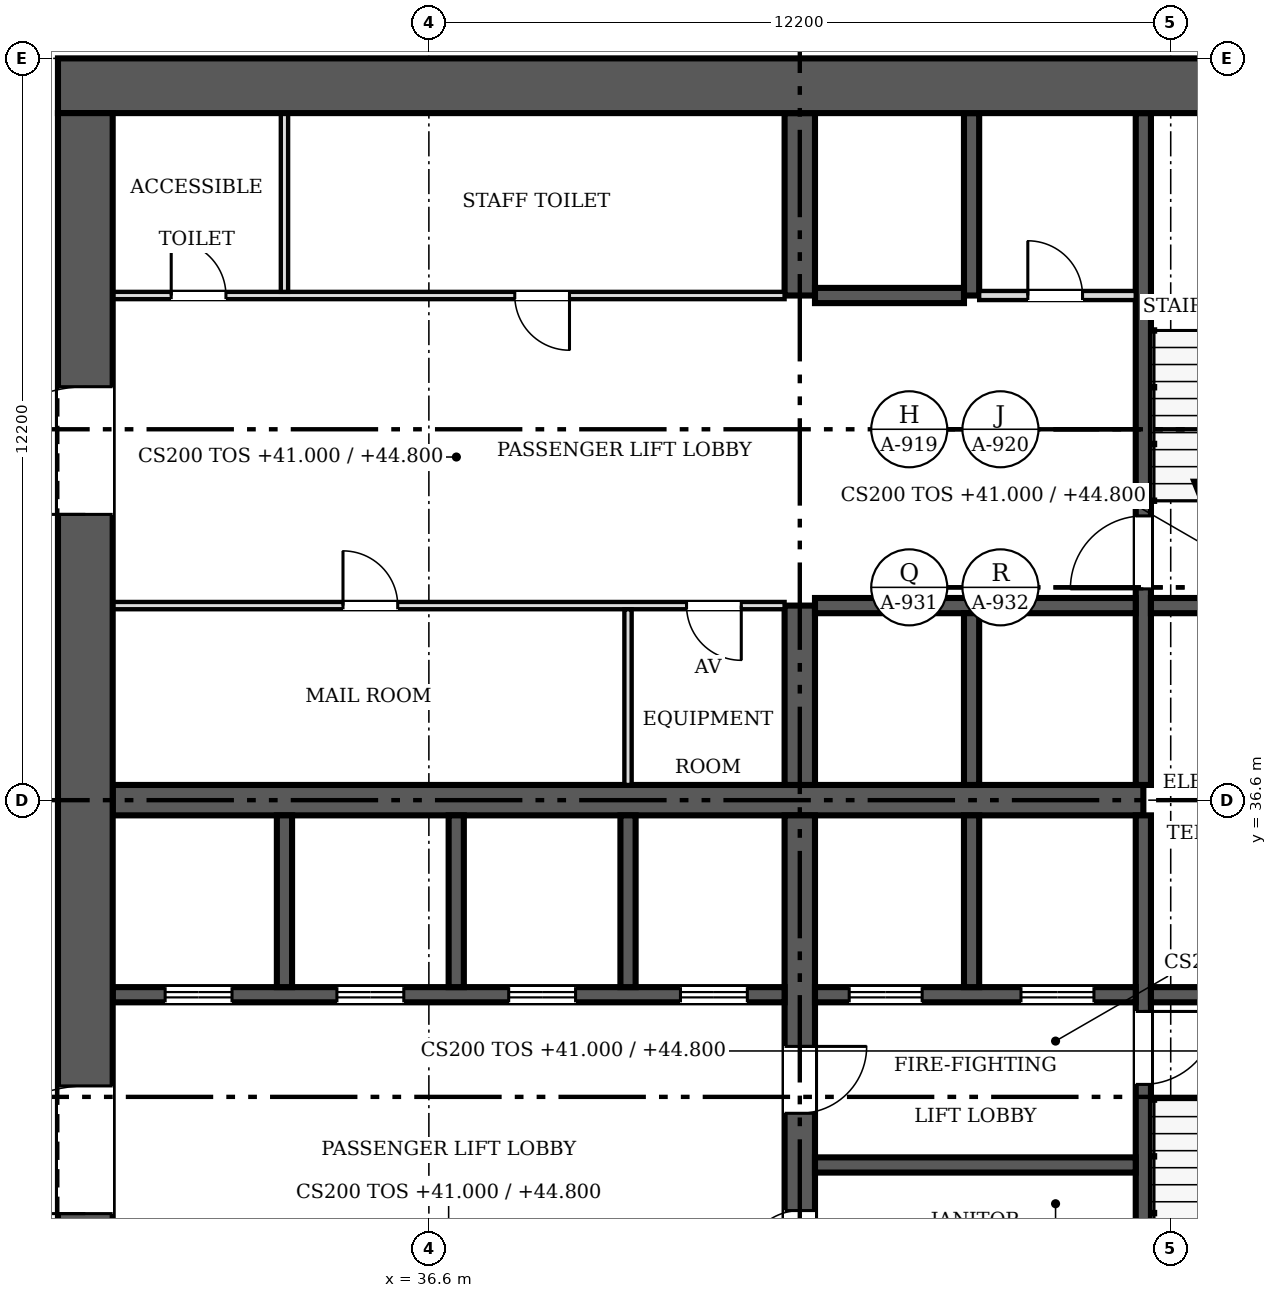
"""IFC4 building model, lengths in metres.
Left out: names, types, materials, properties, quantities, classifications, styles, units other than length and angle.
Written with IfcOpenShell. Run it as: python <this file> out.ifc"""

import sys

from ifc_helpers import new_model, si_unit, direction, frame, frame_2d, origin, place, context, subcontext, project, spatial, rectangle, extrude, source, transform, mapped, element, fill, save


model = new_model("IFC4")
c1 = context("Model", 3, precision=1e-05, world=origin(), true_north=direction((0.0, 1.0)))
c2 = subcontext(c1, "Body", "Model", "MODEL_VIEW")
j1 = project(units=[si_unit("LENGTHUNIT", "METRE"), si_unit("PLANEANGLEUNIT", "RADIAN")], contexts=[c1])
p1 = place(None, origin())
s1 = spatial("IfcSite", under=j1, at=p1, CompositionType="ELEMENT")
p2 = place(p1, origin())
s2 = spatial("IfcBuilding", under=s1, at=p2, CompositionType="ELEMENT")
p3 = place(p2, frame((0.0, 0.0, 41.0)))
s3 = spatial("IfcBuildingStorey", under=s2, at=p3, CompositionType="ELEMENT", Elevation=41.0)
p4 = place(p3, frame((30.95, 25.3, 0.0), z_axis=(0.0, 0.0, 1.0), x_axis=(0.0, 1.0, 0.0)))
e1 = element("IfcWall", 1, at=p4, inside=s3, PredefinedType="SHEAR", context=c2, shape_type="SweptSolid", body=[
    extrude(rectangle(XDim=22.6, YDim=0.9, at=frame_2d((11.3, 0.0))), origin(), (0.0, 0.0, 1.0), 3.8),
])
m1 = source(origin(), c2, "Body", "SweptSolid", [
    extrude(rectangle(XDim=2.1, YDim=2.4, at=frame_2d((1.05, 1.2))), frame((0.0, 0.46, 0.0), z_axis=(0.0, -1.0, 0.0), x_axis=(1.0, 0.0, 0.0)), (0.0, 0.0, 1.0), 0.92),
])
p5 = place(p4, frame((4.5, 0.0, 0.0)))
e2 = element("IfcOpeningElement", 2, at=p5, cuts=e1, PredefinedType="OPENING", context=c2, shape_type="MappedRepresentation", body=[
    mapped(m1, transform((0.0, 0.0, 0.0), scale=1.0)),
])
p6 = place(p4, frame((16.0, 0.0, 0.0)))
e3 = element("IfcOpeningElement", 3, at=p6, cuts=e1, PredefinedType="OPENING", context=c2, shape_type="MappedRepresentation", body=[
    mapped(m1, transform((0.0, 0.0, 0.0), scale=1.0)),
])
p7 = place(p3, frame((30.5, 48.35, 0.0), z_axis=(0.0, 0.0, 1.0), x_axis=(1.0, 0.0, 0.0)))
e4 = element("IfcWall", 4, at=p7, inside=s3, PredefinedType="SHEAR", context=c2, shape_type="SweptSolid", body=[
    extrude(rectangle(XDim=24.4, YDim=0.9, at=frame_2d((12.2, 0.0))), origin(), (0.0, 0.0, 1.0), 3.8),
])
p8 = place(p3, frame((31.4, 36.6, 0.0), z_axis=(0.0, 0.0, 1.0), x_axis=(1.0, 0.0, 0.0)))
e5 = element("IfcWall", 5, at=p8, inside=s3, PredefinedType="SHEAR", context=c2, shape_type="SweptSolid", body=[
    extrude(rectangle(XDim=16.95, YDim=0.5, at=frame_2d((8.475, 0.0))), origin(), (0.0, 0.0, 1.0), 3.8),
])
p9 = place(p3, frame((42.7, 36.35, 0.0), z_axis=(0.0, 0.0, 1.0), x_axis=(0.0, -1.0, 0.0)))
e6 = element("IfcWall", 6, at=p9, inside=s3, PredefinedType="SHEAR", context=c2, shape_type="SweptSolid", body=[
    extrude(rectangle(XDim=11.05, YDim=0.5, at=frame_2d((5.525, 0.0))), origin(), (0.0, 0.0, 1.0), 3.8),
])
m2 = source(origin(), c2, "Body", "SweptSolid", [
    extrude(rectangle(XDim=0.9, YDim=2.1, at=frame_2d((0.45, 1.05))), frame((0.0, 0.26, 0.0), z_axis=(0.0, -1.0, 0.0), x_axis=(1.0, 0.0, 0.0)), (0.0, 0.0, 1.0), 0.52),
])
p10 = place(p9, frame((6.5, 0.0, 0.0)))
e7 = element("IfcOpeningElement", 7, at=p10, cuts=e6, PredefinedType="OPENING", context=c2, shape_type="MappedRepresentation", body=[
    mapped(m2, transform((0.0, 0.0, 0.0), scale=1.0)),
])
m3 = source(origin(), c2, "Body", "SweptSolid", [
    extrude(rectangle(XDim=1.1, YDim=2.1, at=frame_2d((0.55, 1.05))), frame((0.0, 0.26, 0.0), z_axis=(0.0, -1.0, 0.0), x_axis=(1.0, 0.0, 0.0)), (0.0, 0.0, 1.0), 0.52),
])
p11 = place(p9, frame((3.8, 0.0, 0.0)))
e8 = element("IfcOpeningElement", 8, at=p11, cuts=e6, PredefinedType="OPENING", context=c2, shape_type="MappedRepresentation", body=[
    mapped(m3, transform((0.0, 0.0, 0.0), scale=1.0)),
])
p12 = place(p3, frame((42.7, 36.85, 0.0), z_axis=(0.0, 0.0, 1.0), x_axis=(0.0, 1.0, 0.0)))
e9 = element("IfcWall", 9, at=p12, inside=s3, PredefinedType="SHEAR", context=c2, shape_type="SweptSolid", body=[
    extrude(rectangle(XDim=2.95, YDim=0.5, at=frame_2d((1.475, 0.0))), origin(), (0.0, 0.0, 1.0), 3.8),
])
p13 = place(p3, frame((42.7, 44.9, 0.0), z_axis=(0.0, 0.0, 1.0), x_axis=(0.0, 1.0, 0.0)))
e10 = element("IfcWall", 10, at=p13, inside=s3, PredefinedType="SHEAR", context=c2, shape_type="SweptSolid", body=[
    extrude(rectangle(XDim=3.0, YDim=0.5, at=frame_2d((1.5, 0.0))), origin(), (0.0, 0.0, 1.0), 3.8),
])
p14 = place(p3, frame((48.35, 36.35, 0.0), z_axis=(0.0, 0.0, 1.0), x_axis=(0.0, -1.0, 0.0)))
e11 = element("IfcWall", 11, at=p14, inside=s3, PredefinedType="SOLIDWALL", context=c2, shape_type="SweptSolid", body=[
    extrude(rectangle(XDim=11.05, YDim=0.25, at=frame_2d((5.525, 0.0))), origin(), (0.0, 0.0, 1.0), 3.8),
])
m4 = source(origin(), c2, "Body", "SweptSolid", [
    extrude(rectangle(XDim=1.2, YDim=2.1, at=frame_2d((0.6, 1.05))), frame((0.0, 0.135, 0.0), z_axis=(0.0, -1.0, 0.0), x_axis=(1.0, 0.0, 0.0)), (0.0, 0.0, 1.0), 0.27),
])
p15 = place(p14, frame((3.225, 0.0, 0.0)))
e12 = element("IfcOpeningElement", 12, at=p15, cuts=e11, PredefinedType="OPENING", context=c2, shape_type="MappedRepresentation", body=[
    mapped(m4, transform((0.0, 0.0, 0.0), scale=1.0)),
])
p16 = place(p3, frame((48.35, 47.9, 0.0), z_axis=(0.0, 0.0, 1.0), x_axis=(0.0, -1.0, 0.0)))
e13 = element("IfcWall", 13, at=p16, inside=s3, PredefinedType="SOLIDWALL", context=c2, shape_type="SweptSolid", body=[
    extrude(rectangle(XDim=11.05, YDim=0.25, at=frame_2d((5.525, 0.0))), origin(), (0.0, 0.0, 1.0), 3.8),
])
p17 = place(p16, frame((6.625, 0.0, 0.0)))
e14 = element("IfcOpeningElement", 14, at=p17, cuts=e13, PredefinedType="OPENING", context=c2, shape_type="MappedRepresentation", body=[
    mapped(m4, transform((0.0, 0.0, 0.0), scale=1.0)),
])
p18 = place(p3, frame((42.45, 33.4, 0.0), z_axis=(0.0, 0.0, 1.0), x_axis=(-1.0, 0.0, 0.0)))
e15 = element("IfcWall", 15, at=p18, inside=s3, PredefinedType="SOLIDWALL", context=c2, shape_type="SweptSolid", body=[
    extrude(rectangle(XDim=11.05, YDim=0.25, at=frame_2d((5.525, 0.0))), origin(), (0.0, 0.0, 1.0), 3.8),
])
m5 = source(origin(), c2, "Body", "SweptSolid", [
    extrude(rectangle(XDim=1.1, YDim=2.1, at=frame_2d((0.55, 1.05))), frame((0.0, 0.135, 0.0), z_axis=(0.0, -1.0, 0.0), x_axis=(1.0, 0.0, 0.0)), (0.0, 0.0, 1.0), 0.27),
])
p19 = place(p18, frame((9.087, 0.0, 0.0)))
e16 = element("IfcOpeningElement", 16, at=p19, cuts=e15, PredefinedType="OPENING", context=c2, shape_type="MappedRepresentation", body=[
    mapped(m5, transform((0.0, 0.0, 0.0), scale=1.0)),
])
p20 = place(p18, frame((6.262, 0.0, 0.0)))
e17 = element("IfcOpeningElement", 17, at=p20, cuts=e15, PredefinedType="OPENING", context=c2, shape_type="MappedRepresentation", body=[
    mapped(m5, transform((0.0, 0.0, 0.0), scale=1.0)),
])
p21 = place(p18, frame((3.438, 0.0, 0.0)))
e18 = element("IfcOpeningElement", 18, at=p21, cuts=e15, PredefinedType="OPENING", context=c2, shape_type="MappedRepresentation", body=[
    mapped(m5, transform((0.0, 0.0, 0.0), scale=1.0)),
])
p22 = place(p18, frame((0.613, 0.0, 0.0)))
e19 = element("IfcOpeningElement", 19, at=p22, cuts=e15, PredefinedType="OPENING", context=c2, shape_type="MappedRepresentation", body=[
    mapped(m5, transform((0.0, 0.0, 0.0), scale=1.0)),
])
p23 = place(p3, frame((48.225, 33.4, 0.0), z_axis=(0.0, 0.0, 1.0), x_axis=(-1.0, 0.0, 0.0)))
e20 = element("IfcWall", 20, at=p23, inside=s3, PredefinedType="SOLIDWALL", context=c2, shape_type="SweptSolid", body=[
    extrude(rectangle(XDim=5.275, YDim=0.25, at=frame_2d((2.638, 0.0))), origin(), (0.0, 0.0, 1.0), 3.8),
])
p24 = place(p23, frame((3.512, 0.0, 0.0)))
e21 = element("IfcOpeningElement", 21, at=p24, cuts=e20, PredefinedType="OPENING", context=c2, shape_type="MappedRepresentation", body=[
    mapped(m4, transform((0.0, 0.0, 0.0), scale=1.0)),
])
p25 = place(p23, frame((0.688, 0.0, 0.0)))
e22 = element("IfcOpeningElement", 22, at=p25, cuts=e20, PredefinedType="OPENING", context=c2, shape_type="MappedRepresentation", body=[
    mapped(m4, transform((0.0, 0.0, 0.0), scale=1.0)),
])
p26 = place(p3, frame((48.475, 33.4, 0.0), z_axis=(0.0, 0.0, 1.0), x_axis=(1.0, 0.0, 0.0)))
e23 = element("IfcWall", 23, at=p26, inside=s3, PredefinedType="SOLIDWALL", context=c2, shape_type="SweptSolid", body=[
    extrude(rectangle(XDim=3.525, YDim=0.25, at=frame_2d((1.762, 0.0))), origin(), (0.0, 0.0, 1.0), 3.8),
])
p27 = place(p3, frame((42.95, 39.8, 0.0), z_axis=(0.0, 0.0, 1.0), x_axis=(1.0, 0.0, 0.0)))
e24 = element("IfcWall", 24, at=p27, inside=s3, PredefinedType="SOLIDWALL", context=c2, shape_type="SweptSolid", body=[
    extrude(rectangle(XDim=5.275, YDim=0.25, at=frame_2d((2.638, 0.0))), origin(), (0.0, 0.0, 1.0), 3.8),
])
p28 = place(p3, frame((48.475, 39.8, 0.0), z_axis=(0.0, 0.0, 1.0), x_axis=(1.0, 0.0, 0.0)))
e25 = element("IfcWall", 25, at=p28, inside=s3, PredefinedType="SOLIDWALL", context=c2, shape_type="SweptSolid", body=[
    extrude(rectangle(XDim=3.525, YDim=0.25, at=frame_2d((1.762, 0.0))), origin(), (0.0, 0.0, 1.0), 3.8),
])
p29 = place(p3, frame((45.525, 33.525, 0.0), z_axis=(0.0, 0.0, 1.0), x_axis=(0.0, 1.0, 0.0)))
e26 = element("IfcWall", 26, at=p29, inside=s3, PredefinedType="SOLIDWALL", context=c2, shape_type="SweptSolid", body=[
    extrude(rectangle(XDim=2.825, YDim=0.25, at=frame_2d((1.413, 0.0))), origin(), (0.0, 0.0, 1.0), 3.8),
])
p30 = place(p3, frame((45.525, 36.85, 0.0), z_axis=(0.0, 0.0, 1.0), x_axis=(0.0, 1.0, 0.0)))
e27 = element("IfcWall", 27, at=p30, inside=s3, PredefinedType="SOLIDWALL", context=c2, shape_type="SweptSolid", body=[
    extrude(rectangle(XDim=2.825, YDim=0.25, at=frame_2d((1.413, 0.0))), origin(), (0.0, 0.0, 1.0), 3.8),
])
p31 = place(p3, frame((42.95, 30.6, 0.0), z_axis=(0.0, 0.0, 1.0), x_axis=(1.0, 0.0, 0.0)))
e28 = element("IfcWall", 28, at=p31, inside=s3, PredefinedType="SOLIDWALL", context=c2, shape_type="SweptSolid", body=[
    extrude(rectangle(XDim=5.275, YDim=0.25, at=frame_2d((2.638, 0.0))), origin(), (0.0, 0.0, 1.0), 3.8),
])
for number, where, z_axis, x_axis in (
    (29, (34.225, 33.525, 0.0), (0.0, 0.0, 1.0), (0.0, 1.0, 0.0)),
    (30, (37.05, 33.525, 0.0), (0.0, 0.0, 1.0), (0.0, 1.0, 0.0)),
    (31, (39.875, 33.525, 0.0), (0.0, 0.0, 1.0), (0.0, 1.0, 0.0)),
):
    element("IfcWall", number, at=place(p3, frame(where, z_axis=z_axis, x_axis=x_axis)), inside=s3, PredefinedType="SOLIDWALL", context=c2, shape_type="SweptSolid", body=[
        extrude(rectangle(XDim=2.825, YDim=0.25, at=frame_2d((1.413, 0.0))), origin(), (0.0, 0.0, 1.0), 3.8),
    ])
p32 = place(p3, frame((45.525, 44.9, 0.0), z_axis=(0.0, 0.0, 1.0), x_axis=(0.0, 1.0, 0.0)))
e32 = element("IfcWall", 32, at=p32, inside=s3, PredefinedType="SOLIDWALL", context=c2, shape_type="SweptSolid", body=[
    extrude(rectangle(XDim=3.0, YDim=0.25, at=frame_2d((1.5, 0.0))), origin(), (0.0, 0.0, 1.0), 3.8),
])
p33 = place(p3, frame((42.95, 44.9, 0.0), z_axis=(0.0, 0.0, 1.0), x_axis=(1.0, 0.0, 0.0)))
e33 = element("IfcWall", 33, at=p33, inside=s3, PredefinedType="SOLIDWALL", context=c2, shape_type="SweptSolid", body=[
    extrude(rectangle(XDim=2.45, YDim=0.25, at=frame_2d((1.225, 0.0))), origin(), (0.0, 0.0, 1.0), 3.8),
])
p34 = place(p3, frame((42.45, 39.8, 0.0), z_axis=(0.0, 0.0, 1.0), x_axis=(-1.0, 0.0, 0.0)))
e34 = element("IfcWall", 34, at=p34, inside=s3, PredefinedType="PARTITIONING", context=c2, shape_type="SweptSolid", body=[
    extrude(rectangle(XDim=11.05, YDim=0.12, at=frame_2d((5.525, 0.0))), origin(), (0.0, 0.0, 1.0), 3.6),
])
m6 = source(origin(), c2, "Body", "SweptSolid", [
    extrude(rectangle(XDim=0.9, YDim=2.1, at=frame_2d((0.45, 1.05))), frame((0.0, 0.07, 0.0), z_axis=(0.0, -1.0, 0.0), x_axis=(1.0, 0.0, 0.0)), (0.0, 0.0, 1.0), 0.14),
])
p35 = place(p34, frame((6.363, 0.0, 0.0)))
e35 = element("IfcOpeningElement", 35, at=p35, cuts=e34, PredefinedType="OPENING", context=c2, shape_type="MappedRepresentation", body=[
    mapped(m6, transform((0.0, 0.0, 0.0), scale=1.0)),
])
p36 = place(p34, frame((0.712, 0.0, 0.0)))
e36 = element("IfcOpeningElement", 36, at=p36, cuts=e34, PredefinedType="OPENING", context=c2, shape_type="MappedRepresentation", body=[
    mapped(m6, transform((0.0, 0.0, 0.0), scale=1.0)),
])
p37 = place(p3, frame((31.4, 44.9, 0.0), z_axis=(0.0, 0.0, 1.0), x_axis=(1.0, 0.0, 0.0)))
e37 = element("IfcWall", 37, at=p37, inside=s3, PredefinedType="PARTITIONING", context=c2, shape_type="SweptSolid", body=[
    extrude(rectangle(XDim=11.05, YDim=0.12, at=frame_2d((5.525, 0.0))), origin(), (0.0, 0.0, 1.0), 3.6),
])
p38 = place(p37, frame((0.962, 0.0, 0.0)))
e38 = element("IfcOpeningElement", 38, at=p38, cuts=e37, PredefinedType="OPENING", context=c2, shape_type="MappedRepresentation", body=[
    mapped(m6, transform((0.0, 0.0, 0.0), scale=1.0)),
])
p39 = place(p37, frame((6.613, 0.0, 0.0)))
e39 = element("IfcOpeningElement", 39, at=p39, cuts=e37, PredefinedType="OPENING", context=c2, shape_type="MappedRepresentation", body=[
    mapped(m6, transform((0.0, 0.0, 0.0), scale=1.0)),
])
p40 = place(p3, frame((39.875, 36.85, 0.0), z_axis=(0.0, 0.0, 1.0), x_axis=(0.0, 1.0, 0.0)))
e40 = element("IfcWall", 40, at=p40, inside=s3, PredefinedType="PARTITIONING", context=c2, shape_type="SweptSolid", body=[
    extrude(rectangle(XDim=2.89, YDim=0.12, at=frame_2d((1.445, 0.0))), origin(), (0.0, 0.0, 1.0), 3.6),
])
p41 = place(p3, frame((34.225, 44.96, 0.0), z_axis=(0.0, 0.0, 1.0), x_axis=(0.0, 1.0, 0.0)))
e41 = element("IfcWall", 41, at=p41, inside=s3, PredefinedType="PARTITIONING", context=c2, shape_type="SweptSolid", body=[
    extrude(rectangle(XDim=2.94, YDim=0.12, at=frame_2d((1.47, 0.0))), origin(), (0.0, 0.0, 1.0), 3.6),
])
p42 = place(p3, frame((45.65, 44.9, 0.0), z_axis=(0.0, 0.0, 1.0), x_axis=(1.0, 0.0, 0.0)))
e42 = element("IfcWall", 42, at=p42, inside=s3, PredefinedType="PARTITIONING", context=c2, shape_type="SweptSolid", body=[
    extrude(rectangle(XDim=2.575, YDim=0.15, at=frame_2d((1.288, 0.0))), origin(), (0.0, 0.0, 1.0), 3.6),
])
m7 = source(origin(), c2, "Body", "SweptSolid", [
    extrude(rectangle(XDim=0.9, YDim=2.1, at=frame_2d((0.45, 1.05))), frame((0.0, 0.085, 0.0), z_axis=(0.0, -1.0, 0.0), x_axis=(1.0, 0.0, 0.0)), (0.0, 0.0, 1.0), 0.17),
])
p43 = place(p42, frame((0.8, 0.0, 0.0)))
e43 = element("IfcOpeningElement", 43, at=p43, cuts=e42, PredefinedType="OPENING", context=c2, shape_type="MappedRepresentation", body=[
    mapped(m7, transform((0.0, 0.0, 0.0), scale=1.0)),
])
m8 = source(origin(), c2, "Body", "SweptSolid", [
    extrude(rectangle(XDim=2.1, YDim=2.4, at=frame_2d((1.05, 1.2))), frame((0.0, 0.025, 0.0), z_axis=(0.0, -1.0, 0.0), x_axis=(1.0, 0.0, 0.0)), (0.0, 0.0, 1.0), 0.05),
])
p44 = place(p5, origin())
e44 = element("IfcDoor", 44, at=p44, inside=s3, OperationType="DOUBLE_DOOR_SINGLE_SWING", PredefinedType="DOOR", context=c2, shape_type="MappedRepresentation", body=[
    mapped(m8, transform((0.0, 0.0, 0.0), scale=1.0)),
])
fill(e2, e44)
p45 = place(p6, origin())
e45 = element("IfcDoor", 45, at=p45, inside=s3, OperationType="DOUBLE_DOOR_SINGLE_SWING", PredefinedType="DOOR", context=c2, shape_type="MappedRepresentation", body=[
    mapped(m8, transform((0.0, 0.0, 0.0), scale=1.0)),
])
fill(e3, e45)
m9 = source(origin(), c2, "Body", "SweptSolid", [
    extrude(rectangle(XDim=0.9, YDim=2.1, at=frame_2d((0.45, 1.05))), frame((0.0, 0.025, 0.0), z_axis=(0.0, -1.0, 0.0), x_axis=(1.0, 0.0, 0.0)), (0.0, 0.0, 1.0), 0.05),
])
p46 = place(p10, origin())
e46 = element("IfcDoor", 46, at=p46, inside=s3, OperationType="SINGLE_SWING_RIGHT", PredefinedType="DOOR", context=c2, shape_type="MappedRepresentation", body=[
    mapped(m9, transform((0.0, 0.0, 0.0), scale=1.0)),
])
fill(e7, e46)
m10 = source(origin(), c2, "Body", "SweptSolid", [
    extrude(rectangle(XDim=1.1, YDim=2.1, at=frame_2d((0.55, 1.05))), frame((0.0, 0.025, 0.0), z_axis=(0.0, -1.0, 0.0), x_axis=(1.0, 0.0, 0.0)), (0.0, 0.0, 1.0), 0.05),
])
p47 = place(p11, origin())
e47 = element("IfcDoor", 47, at=p47, inside=s3, OperationType="SINGLE_SWING_LEFT", PredefinedType="DOOR", context=c2, shape_type="MappedRepresentation", body=[
    mapped(m10, transform((0.0, 0.0, 0.0), scale=1.0)),
])
fill(e8, e47)
m11 = source(origin(), c2, "Body", "SweptSolid", [
    extrude(rectangle(XDim=1.2, YDim=2.1, at=frame_2d((0.6, 1.05))), frame((0.0, 0.025, 0.0), z_axis=(0.0, -1.0, 0.0), x_axis=(1.0, 0.0, 0.0)), (0.0, 0.0, 1.0), 0.05),
])
p48 = place(p15, origin())
e48 = element("IfcDoor", 48, at=p48, inside=s3, OperationType="SINGLE_SWING_LEFT", PredefinedType="DOOR", context=c2, shape_type="MappedRepresentation", body=[
    mapped(m11, transform((0.0, 0.0, 0.0), scale=1.0)),
])
fill(e12, e48)
p49 = place(p17, origin())
e49 = element("IfcDoor", 49, at=p49, inside=s3, OperationType="SINGLE_SWING_RIGHT", PredefinedType="DOOR", context=c2, shape_type="MappedRepresentation", body=[
    mapped(m11, transform((0.0, 0.0, 0.0), scale=1.0)),
])
fill(e14, e49)
p50 = place(p19, origin())
e50 = element("IfcDoor", 50, at=p50, inside=s3, OperationType="DOUBLE_DOOR_SLIDING", PredefinedType="DOOR", context=c2, shape_type="MappedRepresentation", body=[
    mapped(m10, transform((0.0, 0.0, 0.0), scale=1.0)),
])
fill(e16, e50)
p51 = place(p20, origin())
e51 = element("IfcDoor", 51, at=p51, inside=s3, OperationType="DOUBLE_DOOR_SLIDING", PredefinedType="DOOR", context=c2, shape_type="MappedRepresentation", body=[
    mapped(m10, transform((0.0, 0.0, 0.0), scale=1.0)),
])
fill(e17, e51)
p52 = place(p21, origin())
e52 = element("IfcDoor", 52, at=p52, inside=s3, OperationType="DOUBLE_DOOR_SLIDING", PredefinedType="DOOR", context=c2, shape_type="MappedRepresentation", body=[
    mapped(m10, transform((0.0, 0.0, 0.0), scale=1.0)),
])
fill(e18, e52)
p53 = place(p22, origin())
e53 = element("IfcDoor", 53, at=p53, inside=s3, OperationType="DOUBLE_DOOR_SLIDING", PredefinedType="DOOR", context=c2, shape_type="MappedRepresentation", body=[
    mapped(m10, transform((0.0, 0.0, 0.0), scale=1.0)),
])
fill(e19, e53)
p54 = place(p24, origin())
e54 = element("IfcDoor", 54, at=p54, inside=s3, OperationType="DOUBLE_DOOR_SLIDING", PredefinedType="DOOR", context=c2, shape_type="MappedRepresentation", body=[
    mapped(m11, transform((0.0, 0.0, 0.0), scale=1.0)),
])
fill(e21, e54)
p55 = place(p25, origin())
e55 = element("IfcDoor", 55, at=p55, inside=s3, OperationType="DOUBLE_DOOR_SLIDING", PredefinedType="DOOR", context=c2, shape_type="MappedRepresentation", body=[
    mapped(m11, transform((0.0, 0.0, 0.0), scale=1.0)),
])
fill(e22, e55)
p56 = place(p35, origin())
e56 = element("IfcDoor", 56, at=p56, inside=s3, OperationType="SINGLE_SWING_RIGHT", PredefinedType="DOOR", context=c2, shape_type="MappedRepresentation", body=[
    mapped(m9, transform((0.0, 0.0, 0.0), scale=1.0)),
])
fill(e35, e56)
p57 = place(p36, origin())
e57 = element("IfcDoor", 57, at=p57, inside=s3, OperationType="SINGLE_SWING_LEFT", PredefinedType="DOOR", context=c2, shape_type="MappedRepresentation", body=[
    mapped(m9, transform((0.0, 0.0, 0.0), scale=1.0)),
])
fill(e36, e57)
p58 = place(p38, origin())
e58 = element("IfcDoor", 58, at=p58, inside=s3, OperationType="SINGLE_SWING_LEFT", PredefinedType="DOOR", context=c2, shape_type="MappedRepresentation", body=[
    mapped(m9, transform((0.0, 0.0, 0.0), scale=1.0)),
])
fill(e38, e58)
p59 = place(p39, origin())
e59 = element("IfcDoor", 59, at=p59, inside=s3, OperationType="SINGLE_SWING_RIGHT", PredefinedType="DOOR", context=c2, shape_type="MappedRepresentation", body=[
    mapped(m9, transform((0.0, 0.0, 0.0), scale=1.0)),
])
fill(e39, e59)
p60 = place(p43, origin())
e60 = element("IfcDoor", 60, at=p60, inside=s3, OperationType="SINGLE_SWING_LEFT", PredefinedType="DOOR", context=c2, shape_type="MappedRepresentation", body=[
    mapped(m9, transform((0.0, 0.0, 0.0), scale=1.0)),
])
fill(e43, e60)
save(model, sys.argv[1])
